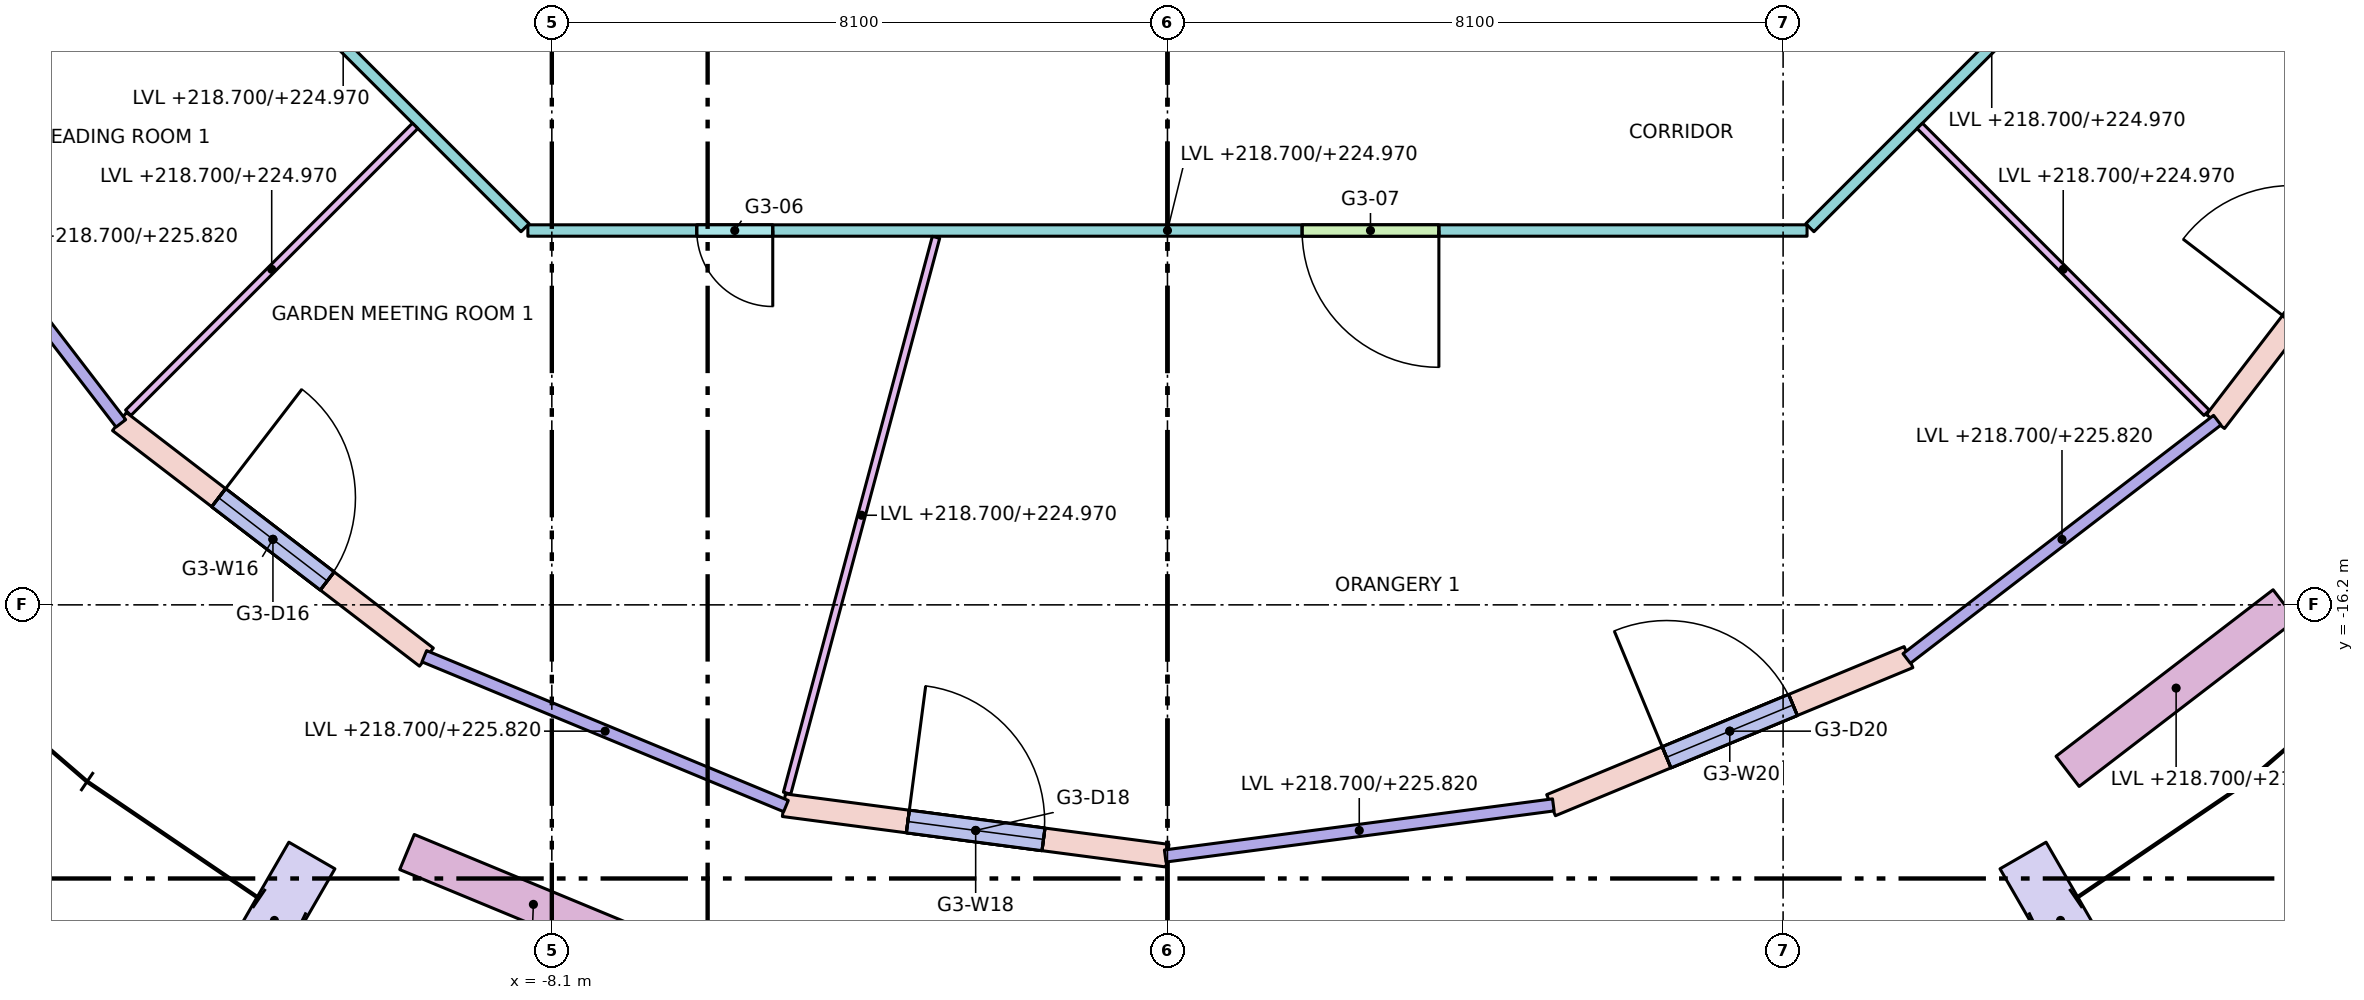
"""IFC4 building model, lengths in metres.
Left out: names, types, materials, properties, quantities, classifications, styles, units other than length and angle.
Written with IfcOpenShell. Run it as: python <this file> out.ifc"""

import sys

from ifc_helpers import new_model, si_unit, direction, frame, frame_2d, origin, origin_2d, place, context, subcontext, project, spatial, rectangle, extrude, element, fill, save


model = new_model("IFC4")
c1 = context("Model", 3, precision=1e-05, world=origin(), true_north=direction((0.0, 1.0)))
c2 = subcontext(c1, "Body", "Model", "MODEL_VIEW")
j1 = project(units=[si_unit("LENGTHUNIT", "METRE"), si_unit("PLANEANGLEUNIT", "RADIAN")], contexts=[c1])
p1 = place(None, origin())
s1 = spatial("IfcSite", under=j1, at=p1, CompositionType="ELEMENT")
p2 = place(p1, origin())
s2 = spatial("IfcBuilding", under=s1, at=p2, CompositionType="ELEMENT")
p3 = place(p2, frame((0.0, 0.0, 218.7)))
s3 = spatial("IfcBuildingStorey", under=s2, at=p3, CompositionType="ELEMENT", Elevation=218.7)
for number, where, z_axis, x_axis in (
    (1, (-11.505, -19.927, 0.067), (-0.067, -0.116, 0.991), (0.866, -0.5, 0.0)),
    (2, (11.505, -19.927, 0.067), (0.067, -0.116, 0.991), (0.866, 0.5, 0.0)),
):
    element("IfcColumn", number, at=place(p3, frame(where, z_axis=z_axis, x_axis=x_axis)), inside=s3, PredefinedType="COLUMN", context=c2, shape_type="SweptSolid", body=[
        extrude(rectangle(XDim=0.7, YDim=1.0, at=origin_2d()), origin(), (0.0, 0.0, 1.0), 7.332),
    ])
p4 = place(p3, frame((-13.789, -13.789, 0.0), z_axis=(0.0, 0.0, 1.0), x_axis=(0.79335619014, -0.608757714995, 0.0)))
e3 = element("IfcWall", 3, at=p4, inside=s3, PredefinedType="STANDARD", context=c2, shape_type="SweptSolid", body=[
    extrude(rectangle(XDim=5.091, YDim=0.3, at=frame_2d((2.545, 0.0))), origin(), (0.0, 0.0, 1.0), 7.12),
])
p5 = place(p4, frame((1.645, 0.0, 0.0)))
e4 = element("IfcOpeningElement", 4, at=p5, cuts=e3, PredefinedType="OPENING", context=c2, shape_type="SweptSolid", body=[
    extrude(rectangle(XDim=1.8, YDim=2.4, at=frame_2d((0.9, 1.2))), frame((0.0, 0.16, 0.0), z_axis=(0.0, -1.0, 0.0), x_axis=(1.0, 0.0, 0.0)), (0.0, 0.0, 1.0), 0.32),
])
p6 = place(p4, frame((1.645, 0.0, 2.8)))
e5 = element("IfcOpeningElement", 5, at=p6, cuts=e3, PredefinedType="OPENING", context=c2, shape_type="SweptSolid", body=[
    extrude(rectangle(XDim=1.8, YDim=4.1, at=frame_2d((0.9, 2.05))), frame((0.0, 0.16, 0.0), z_axis=(0.0, -1.0, 0.0), x_axis=(1.0, 0.0, 0.0)), (0.0, 0.0, 1.0), 0.32),
])
p7 = place(p3, frame((-5.047, -18.836, 0.0), z_axis=(0.0, 0.0, 1.0), x_axis=(0.99144890792, -0.130495451964, 0.0)))
e6 = element("IfcWall", 6, at=p7, inside=s3, PredefinedType="STANDARD", context=c2, shape_type="SweptSolid", body=[
    extrude(rectangle(XDim=5.091, YDim=0.3, at=frame_2d((2.545, 0.0))), origin(), (0.0, 0.0, 1.0), 7.12),
])
p8 = place(p7, frame((1.645, 0.0, 0.0)))
e7 = element("IfcOpeningElement", 7, at=p8, cuts=e6, PredefinedType="OPENING", context=c2, shape_type="SweptSolid", body=[
    extrude(rectangle(XDim=1.8, YDim=2.4, at=frame_2d((0.9, 1.2))), frame((0.0, 0.16, 0.0), z_axis=(0.0, -1.0, 0.0), x_axis=(1.0, 0.0, 0.0)), (0.0, 0.0, 1.0), 0.32),
])
p9 = place(p7, frame((1.645, 0.0, 2.8)))
e8 = element("IfcOpeningElement", 8, at=p9, cuts=e6, PredefinedType="OPENING", context=c2, shape_type="SweptSolid", body=[
    extrude(rectangle(XDim=1.8, YDim=4.1, at=frame_2d((0.9, 2.05))), frame((0.0, 0.16, 0.0), z_axis=(0.0, -1.0, 0.0), x_axis=(1.0, 0.0, 0.0)), (0.0, 0.0, 1.0), 0.32),
])
p10 = place(p3, frame((5.047, -18.836, 0.0), z_axis=(0.0, 0.0, 1.0), x_axis=(0.923862504675, 0.382724538613, 0.0)))
e9 = element("IfcWall", 9, at=p10, inside=s3, PredefinedType="STANDARD", context=c2, shape_type="SweptSolid", body=[
    extrude(rectangle(XDim=5.091, YDim=0.3, at=frame_2d((2.545, 0.0))), origin(), (0.0, 0.0, 1.0), 7.12),
])
p11 = place(p10, frame((1.645, 0.0, 0.0)))
e10 = element("IfcOpeningElement", 10, at=p11, cuts=e9, PredefinedType="OPENING", context=c2, shape_type="SweptSolid", body=[
    extrude(rectangle(XDim=1.8, YDim=2.4, at=frame_2d((0.9, 1.2))), frame((0.0, 0.16, 0.0), z_axis=(0.0, -1.0, 0.0), x_axis=(1.0, 0.0, 0.0)), (0.0, 0.0, 1.0), 0.32),
])
p12 = place(p10, frame((1.645, 0.0, 2.8)))
e11 = element("IfcOpeningElement", 11, at=p12, cuts=e9, PredefinedType="OPENING", context=c2, shape_type="SweptSolid", body=[
    extrude(rectangle(XDim=1.8, YDim=4.1, at=frame_2d((0.9, 2.05))), frame((0.0, 0.16, 0.0), z_axis=(0.0, -1.0, 0.0), x_axis=(1.0, 0.0, 0.0)), (0.0, 0.0, 1.0), 0.32),
])
p13 = place(p3, frame((13.789, -13.789, 0.0), z_axis=(0.0, 0.0, 1.0), x_axis=(0.608757714995, 0.79335619014, 0.0)))
e12 = element("IfcWall", 12, at=p13, inside=s3, PredefinedType="STANDARD", context=c2, shape_type="SweptSolid", body=[
    extrude(rectangle(XDim=5.091, YDim=0.3, at=frame_2d((2.545, 0.0))), origin(), (0.0, 0.0, 1.0), 7.12),
])
p14 = place(p13, frame((1.645, 0.0, 0.0)))
e13 = element("IfcOpeningElement", 13, at=p14, cuts=e12, PredefinedType="OPENING", context=c2, shape_type="SweptSolid", body=[
    extrude(rectangle(XDim=1.8, YDim=2.4, at=frame_2d((0.9, 1.2))), frame((0.0, 0.16, 0.0), z_axis=(0.0, -1.0, 0.0), x_axis=(1.0, 0.0, 0.0)), (0.0, 0.0, 1.0), 0.32),
])
p15 = place(p13, frame((1.645, 0.0, 2.8)))
e14 = element("IfcOpeningElement", 14, at=p15, cuts=e12, PredefinedType="OPENING", context=c2, shape_type="SweptSolid", body=[
    extrude(rectangle(XDim=1.8, YDim=4.1, at=frame_2d((0.9, 2.05))), frame((0.0, 0.16, 0.0), z_axis=(0.0, -1.0, 0.0), x_axis=(1.0, 0.0, 0.0)), (0.0, 0.0, 1.0), 0.32),
])
p16 = place(p3, frame((-10.006, -19.452, 0.0), z_axis=(0.0, 0.0, 1.0), x_axis=(0.923885420167, -0.382669217998, 0.0)))
e15 = element("IfcWall", 15, at=p16, inside=s3, PredefinedType="PARAPET", context=c2, shape_type="SweptSolid", body=[
    extrude(rectangle(XDim=3.6, YDim=0.5, at=frame_2d((1.8, 0.0))), origin(), (0.0, 0.0, 1.0), 0.9),
])
p17 = place(p3, frame((11.843, -18.391, 0.0), z_axis=(0.0, 0.0, 1.0), x_axis=(0.793326845617, 0.608795955984, 0.0)))
e16 = element("IfcWall", 16, at=p17, inside=s3, PredefinedType="PARAPET", context=c2, shape_type="SweptSolid", body=[
    extrude(rectangle(XDim=3.6, YDim=0.5, at=frame_2d((1.8, 0.0))), origin(), (0.0, 0.0, 1.0), 0.9),
])
p18 = place(p3, frame((13.238, -6.452, 0.0), z_axis=(0.0, 0.0, 1.0), x_axis=(-0.707106781187, -0.707106781187, 0.0)))
e17 = element("IfcWall", 17, at=p18, inside=s3, PredefinedType="PARTITIONING", context=c2, shape_type="SweptSolid", body=[
    extrude(rectangle(XDim=6.768, YDim=0.15, at=frame_2d((3.384, 0.0))), origin(), (0.0, 0.0, 1.0), 6.27),
])
p19 = place(p3, frame((8.415, -11.275, 0.0), z_axis=(0.0, 0.0, 1.0), x_axis=(-1.0, 0.0, 0.0)))
e18 = element("IfcWall", 18, at=p19, inside=s3, PredefinedType="PARTITIONING", context=c2, shape_type="SweptSolid", body=[
    extrude(rectangle(XDim=16.83, YDim=0.15, at=frame_2d((8.415, 0.0))), origin(), (0.0, 0.0, 1.0), 6.27),
])
p20 = place(p19, frame((13.608, 0.0, 0.0)))
e19 = element("IfcOpeningElement", 19, at=p20, cuts=e18, PredefinedType="OPENING", context=c2, shape_type="SweptSolid", body=[
    extrude(rectangle(XDim=1.0, YDim=2.1, at=frame_2d((0.5, 1.05))), frame((0.0, 0.085, 0.0), z_axis=(0.0, -1.0, 0.0), x_axis=(1.0, 0.0, 0.0)), (0.0, 0.0, 1.0), 0.17),
])
p21 = place(p19, frame((4.844, 0.0, 0.0)))
e20 = element("IfcOpeningElement", 20, at=p21, cuts=e18, PredefinedType="OPENING", context=c2, shape_type="SweptSolid", body=[
    extrude(rectangle(XDim=1.8, YDim=2.1, at=frame_2d((0.9, 1.05))), frame((0.0, 0.085, 0.0), z_axis=(0.0, -1.0, 0.0), x_axis=(1.0, 0.0, 0.0)), (0.0, 0.0, 1.0), 0.17),
])
p22 = place(p3, frame((-8.452, -11.238, 0.0), z_axis=(0.0, 0.0, 1.0), x_axis=(-0.707106781187, 0.707106781187, 0.0)))
e21 = element("IfcWall", 21, at=p22, inside=s3, PredefinedType="PARTITIONING", context=c2, shape_type="SweptSolid", body=[
    extrude(rectangle(XDim=6.768, YDim=0.15, at=frame_2d((3.384, 0.0))), origin(), (0.0, 0.0, 1.0), 6.27),
])
p23 = place(p3, frame((-9.898, -9.898, 0.0), z_axis=(0.0, 0.0, 1.0), x_axis=(-0.707106781187, -0.707106781187, 0.0)))
e22 = element("IfcWall", 22, at=p23, inside=s3, PredefinedType="PARTITIONING", context=c2, shape_type="SweptSolid", body=[
    extrude(rectangle(XDim=5.339, YDim=0.1, at=frame_2d((2.669, 0.0))), origin(), (0.0, 0.0, 1.0), 6.27),
])
p24 = place(p3, frame((-3.045, -11.364, 0.0), z_axis=(0.0, 0.0, 1.0), x_axis=(-0.25879840648, -0.965931356155, 0.0)))
e23 = element("IfcWall", 23, at=p24, inside=s3, PredefinedType="PARTITIONING", context=c2, shape_type="SweptSolid", body=[
    extrude(rectangle(XDim=7.572, YDim=0.1, at=frame_2d((3.786, 0.0))), origin(), (0.0, 0.0, 1.0), 6.27),
])
p25 = place(p3, frame((9.898, -9.898, 0.0), z_axis=(0.0, 0.0, 1.0), x_axis=(0.707106781187, -0.707106781187, 0.0)))
e24 = element("IfcWall", 24, at=p25, inside=s3, PredefinedType="PARTITIONING", context=c2, shape_type="SweptSolid", body=[
    extrude(rectangle(XDim=5.339, YDim=0.1, at=frame_2d((2.669, 0.0))), origin(), (0.0, 0.0, 1.0), 6.27),
])
p26 = place(p5, origin())
e25 = element("IfcDoor", 25, at=p26, inside=s3, OperationType="SINGLE_SWING_LEFT", PredefinedType="DOOR", context=c2, shape_type="SweptSolid", body=[
    extrude(rectangle(XDim=1.8, YDim=2.4, at=frame_2d((0.9, 1.2))), frame((0.0, 0.025, 0.0), z_axis=(0.0, -1.0, 0.0), x_axis=(1.0, 0.0, 0.0)), (0.0, 0.0, 1.0), 0.05),
])
fill(e4, e25)
p27 = place(p6, origin())
e26 = element("IfcWindow", 26, at=p27, inside=s3, PartitioningType="SINGLE_PANEL", PredefinedType="WINDOW", context=c2, shape_type="SweptSolid", body=[
    extrude(rectangle(XDim=1.8, YDim=4.1, at=frame_2d((0.9, 2.05))), frame((0.0, 0.03, 0.0), z_axis=(0.0, -1.0, 0.0), x_axis=(1.0, 0.0, 0.0)), (0.0, 0.0, 1.0), 0.06),
])
fill(e5, e26)
p28 = place(p8, origin())
e27 = element("IfcDoor", 27, at=p28, inside=s3, OperationType="SINGLE_SWING_LEFT", PredefinedType="DOOR", context=c2, shape_type="SweptSolid", body=[
    extrude(rectangle(XDim=1.8, YDim=2.4, at=frame_2d((0.9, 1.2))), frame((0.0, 0.025, 0.0), z_axis=(0.0, -1.0, 0.0), x_axis=(1.0, 0.0, 0.0)), (0.0, 0.0, 1.0), 0.05),
])
fill(e7, e27)
p29 = place(p9, origin())
e28 = element("IfcWindow", 28, at=p29, inside=s3, PartitioningType="SINGLE_PANEL", PredefinedType="WINDOW", context=c2, shape_type="SweptSolid", body=[
    extrude(rectangle(XDim=1.8, YDim=4.1, at=frame_2d((0.9, 2.05))), frame((0.0, 0.03, 0.0), z_axis=(0.0, -1.0, 0.0), x_axis=(1.0, 0.0, 0.0)), (0.0, 0.0, 1.0), 0.06),
])
fill(e8, e28)
p30 = place(p11, origin())
e29 = element("IfcDoor", 29, at=p30, inside=s3, OperationType="SINGLE_SWING_LEFT", PredefinedType="DOOR", context=c2, shape_type="SweptSolid", body=[
    extrude(rectangle(XDim=1.8, YDim=2.4, at=frame_2d((0.9, 1.2))), frame((0.0, 0.025, 0.0), z_axis=(0.0, -1.0, 0.0), x_axis=(1.0, 0.0, 0.0)), (0.0, 0.0, 1.0), 0.05),
])
fill(e10, e29)
p31 = place(p12, origin())
e30 = element("IfcWindow", 30, at=p31, inside=s3, PartitioningType="SINGLE_PANEL", PredefinedType="WINDOW", context=c2, shape_type="SweptSolid", body=[
    extrude(rectangle(XDim=1.8, YDim=4.1, at=frame_2d((0.9, 2.05))), frame((0.0, 0.03, 0.0), z_axis=(0.0, -1.0, 0.0), x_axis=(1.0, 0.0, 0.0)), (0.0, 0.0, 1.0), 0.06),
])
fill(e11, e30)
p32 = place(p20, origin())
e31 = element("IfcDoor", 31, at=p32, inside=s3, OperationType="SINGLE_SWING_LEFT", PredefinedType="DOOR", context=c2, shape_type="SweptSolid", body=[
    extrude(rectangle(XDim=1.0, YDim=2.1, at=frame_2d((0.5, 1.05))), frame((0.0, 0.025, 0.0), z_axis=(0.0, -1.0, 0.0), x_axis=(1.0, 0.0, 0.0)), (0.0, 0.0, 1.0), 0.05),
])
fill(e19, e31)
p33 = place(p21, origin())
e32 = element("IfcDoor", 32, at=p33, inside=s3, OperationType="DOUBLE_DOOR_SINGLE_SWING", PredefinedType="DOOR", context=c2, shape_type="SweptSolid", body=[
    extrude(rectangle(XDim=1.8, YDim=2.1, at=frame_2d((0.9, 1.05))), frame((0.0, 0.025, 0.0), z_axis=(0.0, -1.0, 0.0), x_axis=(1.0, 0.0, 0.0)), (0.0, 0.0, 1.0), 0.05),
])
fill(e20, e32)
save(model, sys.argv[1])
